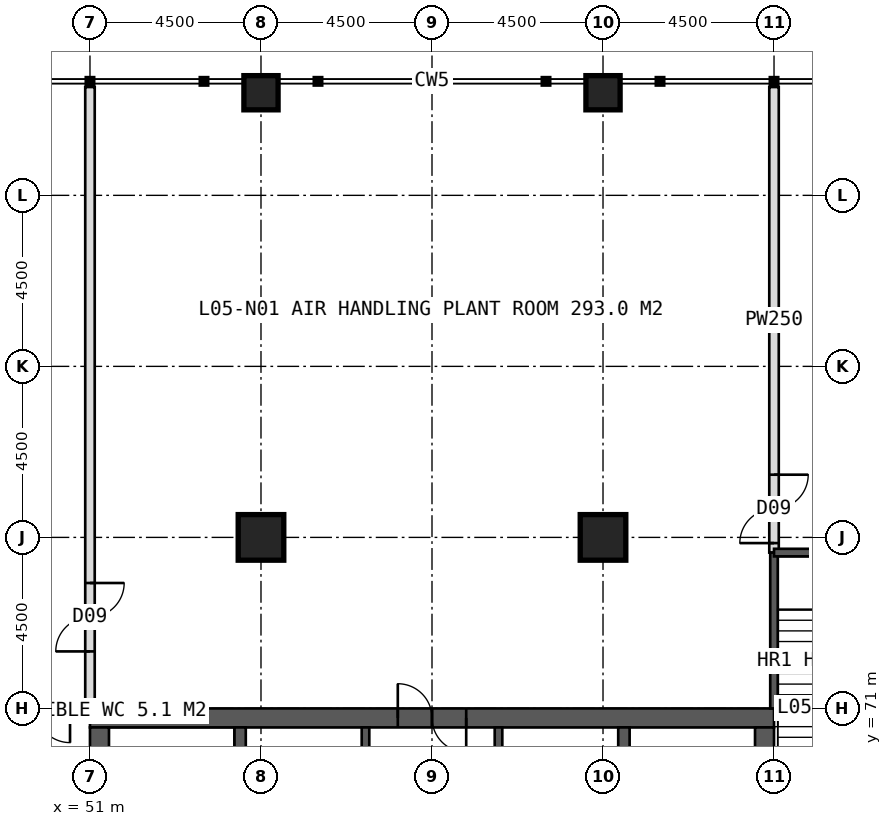
"""IFC4 building model, lengths in metres.
Left out: names, types, materials, properties, quantities, classifications, styles, units other than length and angle.
Written with IfcOpenShell. Run it as: python <this file> out.ifc"""

import sys

from ifc_helpers import new_model, si_unit, direction, frame, frame_2d, origin, origin_2d, place, context, subcontext, project, spatial, rectangle, hollow_rectangle, extrude, element, fill, save


model = new_model("IFC4")
c1 = context("Model", 3, precision=1e-05, world=origin(), true_north=direction((0.0, 1.0)))
c2 = subcontext(c1, "Body", "Model", "MODEL_VIEW")
j1 = project(units=[si_unit("LENGTHUNIT", "METRE"), si_unit("PLANEANGLEUNIT", "RADIAN")], contexts=[c1])
p1 = place(None, origin())
s1 = spatial("IfcSite", under=j1, at=p1, CompositionType="ELEMENT")
p2 = place(p1, origin())
s2 = spatial("IfcBuilding", under=s1, at=p2, CompositionType="ELEMENT")
p3 = place(p2, frame((0.0, 0.0, 26.0)))
s3 = spatial("IfcBuildingStorey", under=s2, at=p3, CompositionType="ELEMENT", Elevation=26.0)
p4 = place(p3, frame((51.0, 70.75, 0.0), z_axis=(0.0, 0.0, 1.0), x_axis=(1.0, 0.0, 0.0)))
e1 = element("IfcWall", 1, at=p4, inside=s3, PredefinedType="SHEAR", context=c2, shape_type="SweptSolid", body=[
    extrude(rectangle(XDim=18.0, YDim=0.5, at=frame_2d((9.0, 0.0))), origin(), (0.0, 0.0, 1.0), 5.0),
])
p5 = place(p4, frame((8.1, 0.0, 0.0)))
e2 = element("IfcOpeningElement", 2, at=p5, cuts=e1, PredefinedType="OPENING", context=c2, shape_type="SweptSolid", body=[
    extrude(rectangle(XDim=1.8, YDim=2.2, at=frame_2d((0.9, 1.1))), frame((0.0, 0.26, 0.0), z_axis=(0.0, -1.0, 0.0), x_axis=(1.0, 0.0, 0.0)), (0.0, 0.0, 1.0), 0.52),
])
p6 = place(p3, frame((51.25, 53.5, 0.0), z_axis=(0.0, 0.0, 1.0), x_axis=(0.0, 1.0, 0.0)))
e3 = element("IfcWall", 3, at=p6, inside=s3, PredefinedType="SHEAR", context=c2, shape_type="SweptSolid", body=[
    extrude(rectangle(XDim=17.0, YDim=0.5, at=frame_2d((8.5, 0.0))), origin(), (0.0, 0.0, 1.0), 5.0),
])
p7 = place(p6, frame((6.0, 0.0, 0.0)))
e4 = element("IfcOpeningElement", 4, at=p7, cuts=e3, PredefinedType="OPENING", context=c2, shape_type="SweptSolid", body=[
    extrude(rectangle(XDim=1.5, YDim=2.2, at=frame_2d((0.75, 1.1))), frame((0.0, 0.26, 0.0), z_axis=(0.0, -1.0, 0.0), x_axis=(1.0, 0.0, 0.0)), (0.0, 0.0, 1.0), 0.52),
])
p8 = place(p3, frame((68.75, 53.5, 0.0), z_axis=(0.0, 0.0, 1.0), x_axis=(0.0, 1.0, 0.0)))
e5 = element("IfcWall", 5, at=p8, inside=s3, PredefinedType="SHEAR", context=c2, shape_type="SweptSolid", body=[
    extrude(rectangle(XDim=17.0, YDim=0.5, at=frame_2d((8.5, 0.0))), origin(), (0.0, 0.0, 1.0), 5.0),
])
p9 = place(p8, frame((9.5, 0.0, 0.0)))
e6 = element("IfcOpeningElement", 6, at=p9, cuts=e5, PredefinedType="OPENING", context=c2, shape_type="SweptSolid", body=[
    extrude(rectangle(XDim=1.5, YDim=2.2, at=frame_2d((0.75, 1.1))), frame((0.0, 0.26, 0.0), z_axis=(0.0, -1.0, 0.0), x_axis=(1.0, 0.0, 0.0)), (0.0, 0.0, 1.0), 0.52),
])
for number, where, z_axis, x_axis in (
    (7, (54.95, 53.5, 0.0), (0.0, 0.0, 1.0), (0.0, 1.0, 0.0)),
    (8, (65.05, 53.5, 0.0), (0.0, 0.0, 1.0), (0.0, 1.0, 0.0)),
):
    element("IfcWall", number, at=place(p3, frame(where, z_axis=z_axis, x_axis=x_axis)), inside=s3, PredefinedType="SHEAR", context=c2, shape_type="SweptSolid", body=[
        extrude(rectangle(XDim=17.0, YDim=0.3, at=frame_2d((8.5, 0.0))), origin(), (0.0, 0.0, 1.0), 5.0),
    ])
for number, where, z_axis, x_axis in (
    (9, (58.25, 53.5, 0.0), (0.0, 0.0, 1.0), (0.0, 1.0, 0.0)),
    (10, (61.75, 53.5, 0.0), (0.0, 0.0, 1.0), (0.0, 1.0, 0.0)),
):
    element("IfcWall", number, at=place(p3, frame(where, z_axis=z_axis, x_axis=x_axis)), inside=s3, PredefinedType="SHEAR", context=c2, shape_type="SweptSolid", body=[
        extrude(rectangle(XDim=17.0, YDim=0.2, at=frame_2d((8.5, 0.0))), origin(), (0.0, 0.0, 1.0), 5.0),
    ])
for number, where, z_axis, x_axis in (
    (11, (55.5, 75.5, 0.0), (0.0, 0.0, 1.0), (1.0, 0.0, 0.0)),
    (12, (64.5, 75.5, 0.0), (0.0, 0.0, 1.0), (1.0, 0.0, 0.0)),
):
    element("IfcColumn", number, at=place(p3, frame(where, z_axis=z_axis, x_axis=x_axis)), inside=s3, PredefinedType="COLUMN", context=c2, shape_type="SweptSolid", body=[
        extrude(hollow_rectangle(XDim=1.2, YDim=1.2, WallThickness=0.1, at=origin_2d()), origin(), (0.0, 0.0, 1.0), 5.0),
    ])
for number, where, z_axis, x_axis in (
    (13, (55.5, 87.2, 0.0), (0.0, 0.0, 1.0), (1.0, 0.0, 0.0)),
    (14, (64.5, 87.2, 0.0), (0.0, 0.0, 1.0), (1.0, 0.0, 0.0)),
):
    element("IfcColumn", number, at=place(p3, frame(where, z_axis=z_axis, x_axis=x_axis)), inside=s3, PredefinedType="COLUMN", context=c2, shape_type="SweptSolid", body=[
        extrude(hollow_rectangle(XDim=0.9, YDim=0.9, WallThickness=0.08, at=origin_2d()), origin(), (0.0, 0.0, 1.0), 5.0),
    ])
p10 = place(p3, frame((69.0, 75.1, 0.0), z_axis=(0.0, 0.0, 1.0), x_axis=(0.0, 1.0, 0.0)))
e15 = element("IfcWall", 15, at=p10, inside=s3, PredefinedType="SOLIDWALL", context=c2, shape_type="SweptSolid", body=[
    extrude(rectangle(XDim=12.25, YDim=0.25, at=frame_2d((6.125, 0.0))), origin(), (0.0, 0.0, 1.0), 4.75),
])
p11 = place(p10, frame((0.25, 0.0, 0.0)))
e16 = element("IfcOpeningElement", 16, at=p11, cuts=e15, PredefinedType="OPENING", context=c2, shape_type="SweptSolid", body=[
    extrude(rectangle(XDim=1.8, YDim=2.2, at=frame_2d((0.9, 1.1))), frame((0.0, 0.135, 0.0), z_axis=(0.0, -1.0, 0.0), x_axis=(1.0, 0.0, 0.0)), (0.0, 0.0, 1.0), 0.27),
])
p12 = place(p3, frame((51.0, 71.0, 0.0), z_axis=(0.0, 0.0, 1.0), x_axis=(0.0, 1.0, 0.0)))
e17 = element("IfcWall", 17, at=p12, inside=s3, PredefinedType="SOLIDWALL", context=c2, shape_type="SweptSolid", body=[
    extrude(rectangle(XDim=16.35, YDim=0.25, at=frame_2d((8.175, 0.0))), origin(), (0.0, 0.0, 1.0), 4.75),
])
p13 = place(p12, frame((1.5, 0.0, 0.0)))
e18 = element("IfcOpeningElement", 18, at=p13, cuts=e17, PredefinedType="OPENING", context=c2, shape_type="SweptSolid", body=[
    extrude(rectangle(XDim=1.8, YDim=2.2, at=frame_2d((0.9, 1.1))), frame((0.0, 0.135, 0.0), z_axis=(0.0, -1.0, 0.0), x_axis=(1.0, 0.0, 0.0)), (0.0, 0.0, 1.0), 0.27),
])
p14 = place(p3, frame((51.0, 71.0, 0.0), z_axis=(0.0, 0.0, 1.0), x_axis=(-1.0, 0.0, 0.0)))
e19 = element("IfcWall", 19, at=p14, inside=s3, PredefinedType="SOLIDWALL", context=c2, shape_type="SweptSolid", body=[
    extrude(rectangle(XDim=16.35, YDim=0.25, at=frame_2d((8.175, 0.0))), origin(), (0.0, 0.0, 1.0), 4.75),
])
p15 = place(p14, frame((0.525, 0.0, 0.0)))
e20 = element("IfcOpeningElement", 20, at=p15, cuts=e19, PredefinedType="OPENING", context=c2, shape_type="SweptSolid", body=[
    extrude(rectangle(XDim=1.8, YDim=2.2, at=frame_2d((0.9, 1.1))), frame((0.0, 0.135, 0.0), z_axis=(0.0, -1.0, 0.0), x_axis=(1.0, 0.0, 0.0)), (0.0, 0.0, 1.0), 0.27),
])
p16 = place(p3, frame((69.0, 71.0, 0.0), z_axis=(0.0, 0.0, 1.0), x_axis=(0.0, 1.0, 0.0)))
e21 = element("IfcWall", 21, at=p16, inside=s3, PredefinedType="SOLIDWALL", context=c2, shape_type="SweptSolid", body=[
    extrude(rectangle(XDim=4.1, YDim=0.2, at=frame_2d((2.05, 0.0))), origin(), (0.0, 0.0, 1.0), 4.75),
])
p17 = place(p3, frame((69.0, 75.1, 0.0), z_axis=(0.0, 0.0, 1.0), x_axis=(1.0, 0.0, 0.0)))
e22 = element("IfcWall", 22, at=p17, inside=s3, PredefinedType="SOLIDWALL", context=c2, shape_type="SweptSolid", body=[
    extrude(rectangle(XDim=3.5, YDim=0.2, at=frame_2d((1.75, 0.0))), origin(), (0.0, 0.0, 1.0), 4.75),
])
p18 = place(p17, frame((1.15, 0.0, 0.0)))
e23 = element("IfcOpeningElement", 23, at=p18, cuts=e22, PredefinedType="OPENING", context=c2, shape_type="SweptSolid", body=[
    extrude(rectangle(XDim=1.2, YDim=2.1, at=frame_2d((0.6, 1.05))), frame((0.0, 0.11, 0.0), z_axis=(0.0, -1.0, 0.0), x_axis=(1.0, 0.0, 0.0)), (0.0, 0.0, 1.0), 0.22),
])
p19 = place(p11, origin())
e24 = element("IfcDoor", 24, at=p19, inside=s3, OperationType="DOUBLE_DOOR_SINGLE_SWING", PredefinedType="DOOR", context=c2, shape_type="SweptSolid", body=[
    extrude(rectangle(XDim=1.8, YDim=2.2, at=frame_2d((0.9, 1.1))), frame((0.0, 0.025, 0.0), z_axis=(0.0, -1.0, 0.0), x_axis=(1.0, 0.0, 0.0)), (0.0, 0.0, 1.0), 0.05),
])
fill(e16, e24)
p20 = place(p13, origin())
e25 = element("IfcDoor", 25, at=p20, inside=s3, OperationType="DOUBLE_DOOR_SINGLE_SWING", PredefinedType="DOOR", context=c2, shape_type="SweptSolid", body=[
    extrude(rectangle(XDim=1.8, YDim=2.2, at=frame_2d((0.9, 1.1))), frame((0.0, 0.025, 0.0), z_axis=(0.0, -1.0, 0.0), x_axis=(1.0, 0.0, 0.0)), (0.0, 0.0, 1.0), 0.05),
])
fill(e18, e25)
p21 = place(p15, origin())
e26 = element("IfcDoor", 26, at=p21, inside=s3, OperationType="DOUBLE_DOOR_SINGLE_SWING", PredefinedType="DOOR", context=c2, shape_type="SweptSolid", body=[
    extrude(rectangle(XDim=1.8, YDim=2.2, at=frame_2d((0.9, 1.1))), frame((0.0, 0.025, 0.0), z_axis=(0.0, -1.0, 0.0), x_axis=(1.0, 0.0, 0.0)), (0.0, 0.0, 1.0), 0.05),
])
fill(e20, e26)
p22 = place(p5, origin())
e27 = element("IfcDoor", 27, at=p22, inside=s3, OperationType="DOUBLE_DOOR_SINGLE_SWING", PredefinedType="DOOR", context=c2, shape_type="SweptSolid", body=[
    extrude(rectangle(XDim=1.8, YDim=2.2, at=frame_2d((0.9, 1.1))), frame((0.0, 0.025, 0.0), z_axis=(0.0, -1.0, 0.0), x_axis=(1.0, 0.0, 0.0)), (0.0, 0.0, 1.0), 0.05),
])
fill(e2, e27)
save(model, sys.argv[1])
